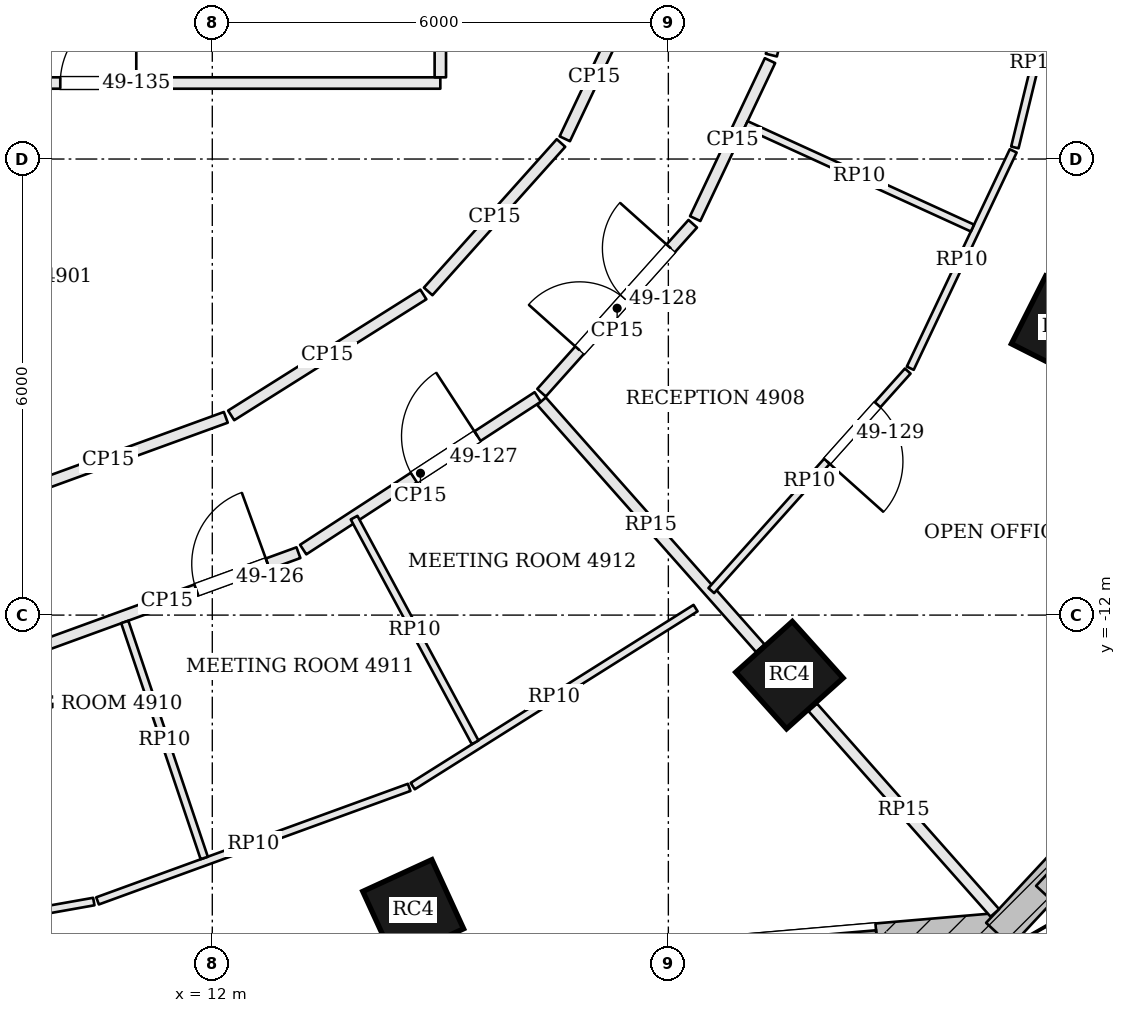
"""IFC4 building model, lengths in metres.
Left out: names, types, materials, properties, quantities, classifications, styles, units other than length and angle.
Written with IfcOpenShell. Run it as: python <this file> out.ifc"""

import sys

from ifc_helpers import new_model, si_unit, direction, frame, frame_2d, origin, origin_2d, place, context, subcontext, project, spatial, rectangle, extrude, element, fill, save


model = new_model("IFC4")
c1 = context("Model", 3, precision=1e-05, world=origin(), true_north=direction((0.0, 1.0)))
c2 = subcontext(c1, "Body", "Model", "MODEL_VIEW")
j1 = project(units=[si_unit("LENGTHUNIT", "METRE"), si_unit("PLANEANGLEUNIT", "RADIAN")], contexts=[c1])
p1 = place(None, origin())
s1 = spatial("IfcSite", under=j1, at=p1, CompositionType="ELEMENT")
p2 = place(p1, origin())
s2 = spatial("IfcBuilding", under=s1, at=p2, CompositionType="ELEMENT")
p3 = place(p2, frame((0.0, 0.0, 201.3)))
s3 = spatial("IfcBuildingStorey", under=s2, at=p3, CompositionType="ELEMENT", Elevation=201.3)
for number, where, z_axis, x_axis in (
    (1, (14.643, -15.881, 0.0), (0.0, 0.0, 1.0), (0.909, 0.417, 0.0)),
    (2, (19.593, -12.79, 0.0), (0.0, 0.0, 1.0), (0.744, 0.668, 0.0)),
    (3, (23.185, -8.21, 0.0), (0.0, 0.0, 1.0), (0.451, 0.893, 0.0)),
):
    element("IfcColumn", number, at=place(p3, frame(where, z_axis=z_axis, x_axis=x_axis)), inside=s3, PredefinedType="COLUMN", context=c2, shape_type="SweptSolid", body=[
        extrude(rectangle(XDim=1.0, YDim=1.0, at=origin_2d()), origin(), (0.0, 0.0, 1.0), 3.9),
    ])
p4 = place(p3, frame((16.91, -16.61, 0.0), z_axis=(0.0, 0.0, 1.0), x_axis=(0.996333165816, 0.085558299972, 0.0)))
e4 = element("IfcWall", 4, at=p4, inside=s3, PredefinedType="SOLIDWALL", context=c2, shape_type="SweptSolid", body=[
    extrude(rectangle(XDim=5.596, YDim=0.45, at=frame_2d((2.798, 0.0))), origin(), (0.0, 0.0, 1.0), 3.7),
])
p5 = place(p4, frame((1.748, 0.0, 0.9)))
e5 = element("IfcOpeningElement", 5, at=p5, cuts=e4, PredefinedType="OPENING", context=c2, shape_type="SweptSolid", body=[
    extrude(rectangle(XDim=2.1, YDim=2.3, at=frame_2d((1.05, 1.15))), frame((0.0, 0.235, 0.0), z_axis=(0.0, -1.0, 0.0), x_axis=(1.0, 0.0, 0.0)), (0.0, 0.0, 1.0), 0.47),
])
p6 = place(p3, frame((22.345, -16.202, 0.0), z_axis=(0.0, 0.0, 1.0), x_axis=(0.681249161265, 0.732051624051, 0.0)))
e6 = element("IfcWall", 6, at=p6, inside=s3, PredefinedType="SOLIDWALL", context=c2, shape_type="SweptSolid", body=[
    extrude(rectangle(XDim=4.527, YDim=0.45, at=frame_2d((2.263, 0.0))), origin(), (0.0, 0.0, 1.0), 3.7),
])
p7 = place(p6, frame((1.213, 0.0, 0.9)))
e7 = element("IfcOpeningElement", 7, at=p7, cuts=e6, PredefinedType="OPENING", context=c2, shape_type="SweptSolid", body=[
    extrude(rectangle(XDim=2.1, YDim=2.3, at=frame_2d((1.05, 1.15))), frame((0.0, 0.235, 0.0), z_axis=(0.0, -1.0, 0.0), x_axis=(1.0, 0.0, 0.0)), (0.0, 0.0, 1.0), 0.47),
])
p8 = place(p3, frame((22.948, -15.665, 3.9), z_axis=(0.0, 0.0, 1.0), x_axis=(0.681269800001, 0.732032417046, 0.0)))
e8 = element("IfcWall", 8, at=p8, inside=s3, PredefinedType="PARAPET", context=c2, shape_type="SweptSolid", body=[
    extrude(rectangle(XDim=3.578, YDim=0.3, at=frame_2d((1.789, 0.0))), origin(), (0.0, 0.0, 1.0), 1.1),
])
p9 = place(p3, frame((9.676, -12.438, 0.0), z_axis=(0.0, 0.0, 1.0), x_axis=(0.939640289748, 0.342163887461, 0.0)))
e9 = element("IfcWall", 9, at=p9, inside=s3, PredefinedType="PARTITIONING", context=c2, shape_type="SweptSolid", body=[
    extrude(rectangle(XDim=3.68, YDim=0.15, at=frame_2d((1.84, 0.0))), origin(), (0.0, 0.0, 1.0), 3.084),
])
p10 = place(p9, frame((2.25, 0.0, 0.0)))
e10 = element("IfcOpeningElement", 10, at=p10, cuts=e9, PredefinedType="OPENING", context=c2, shape_type="SweptSolid", body=[
    extrude(rectangle(XDim=1.0, YDim=2.4, at=frame_2d((0.5, 1.2))), frame((0.0, 0.085, 0.0), z_axis=(0.0, -1.0, 0.0), x_axis=(1.0, 0.0, 0.0)), (0.0, 0.0, 1.0), 0.17),
])
p11 = place(p3, frame((13.196, -11.138, 0.0), z_axis=(0.0, 0.0, 1.0), x_axis=(0.838161670129, 0.545421868582, 0.0)))
e11 = element("IfcWall", 11, at=p11, inside=s3, PredefinedType="PARTITIONING", context=c2, shape_type="SweptSolid", body=[
    extrude(rectangle(XDim=3.681, YDim=0.15, at=frame_2d((1.841, 0.0))), origin(), (0.0, 0.0, 1.0), 3.084),
])
p12 = place(p11, frame((1.736, 0.0, 0.0)))
e12 = element("IfcOpeningElement", 12, at=p12, cuts=e11, PredefinedType="OPENING", context=c2, shape_type="SweptSolid", body=[
    extrude(rectangle(XDim=1.0, YDim=2.4, at=frame_2d((0.5, 1.2))), frame((0.0, 0.085, 0.0), z_axis=(0.0, -1.0, 0.0), x_axis=(1.0, 0.0, 0.0)), (0.0, 0.0, 1.0), 0.17),
])
p13 = place(p3, frame((22.295, -15.918, 0.0), z_axis=(0.0, 0.0, 1.0), x_axis=(-0.663108813626, 0.748523013201, 0.0)))
e13 = element("IfcWall", 13, at=p13, inside=s3, PredefinedType="PARTITIONING", context=c2, shape_type="SweptSolid", body=[
    extrude(rectangle(XDim=3.613, YDim=0.15, at=frame_2d((1.806, 0.0))), origin(), (0.0, 0.0, 1.0), 3.084),
])
p14 = place(p3, frame((19.21, -12.435, 0.0), z_axis=(0.0, 0.0, 1.0), x_axis=(-0.663127094929, 0.748506817584, 0.0)))
e14 = element("IfcWall", 14, at=p14, inside=s3, PredefinedType="PARTITIONING", context=c2, shape_type="SweptSolid", body=[
    extrude(rectangle(XDim=4.341, YDim=0.15, at=frame_2d((2.17, 0.0))), origin(), (0.0, 0.0, 1.0), 3.084),
])
p15 = place(p3, frame((16.332, -9.074, 0.0), z_axis=(0.0, 0.0, 1.0), x_axis=(0.666900122351, 0.74514711756, 0.0)))
e15 = element("IfcWall", 15, at=p15, inside=s3, PredefinedType="PARTITIONING", context=c2, shape_type="SweptSolid", body=[
    extrude(rectangle(XDim=2.983, YDim=0.15, at=frame_2d((1.491, 0.0))), origin(), (0.0, 0.0, 1.0), 3.084),
])
p16 = place(p15, frame((0.75, 0.0, 0.0)))
e16 = element("IfcOpeningElement", 16, at=p16, cuts=e15, PredefinedType="OPENING", context=c2, shape_type="SweptSolid", body=[
    extrude(rectangle(XDim=1.8, YDim=2.1, at=frame_2d((0.9, 1.05))), frame((0.0, 0.085, 0.0), z_axis=(0.0, -1.0, 0.0), x_axis=(1.0, 0.0, 0.0)), (0.0, 0.0, 1.0), 0.17),
])
p17 = place(p3, frame((18.353, -6.784, 0.0), z_axis=(0.0, 0.0, 1.0), x_axis=(0.428086344739, 0.903737838894, 0.0)))
e17 = element("IfcWall", 17, at=p17, inside=s3, PredefinedType="PARTITIONING", context=c2, shape_type="SweptSolid", body=[
    extrude(rectangle(XDim=2.3, YDim=0.15, at=frame_2d((1.15, 0.0))), origin(), (0.0, 0.0, 1.0), 3.084),
])
p18 = place(p3, frame((19.355, -4.633, 0.0), z_axis=(0.0, 0.0, 1.0), x_axis=(0.236703930685, 0.971581828359, 0.0)))
e18 = element("IfcWall", 18, at=p18, inside=s3, PredefinedType="PARTITIONING", context=c2, shape_type="SweptSolid", body=[
    extrude(rectangle(XDim=1.626, YDim=0.15, at=frame_2d((0.813, 0.0))), origin(), (0.0, 0.0, 1.0), 3.084),
])
p19 = place(p3, frame((17.41, -4.102, 0.0), z_axis=(0.0, 0.0, 1.0), x_axis=(-0.428074720318, -0.903743345107, 0.0)))
e19 = element("IfcWall", 19, at=p19, inside=s3, PredefinedType="PARTITIONING", context=c2, shape_type="SweptSolid", body=[
    extrude(rectangle(XDim=1.806, YDim=0.15, at=frame_2d((0.903, 0.0))), origin(), (0.0, 0.0, 1.0), 3.084),
])
p20 = place(p3, frame((16.587, -5.789, 0.0), z_axis=(0.0, 0.0, 1.0), x_axis=(-0.666887460656, -0.745158449472, 0.0)))
e20 = element("IfcWall", 20, at=p20, inside=s3, PredefinedType="PARTITIONING", context=c2, shape_type="SweptSolid", body=[
    extrude(rectangle(XDim=2.62, YDim=0.15, at=frame_2d((1.31, 0.0))), origin(), (0.0, 0.0, 1.0), 3.084),
])
p21 = place(p3, frame((14.777, -7.781, 0.0), z_axis=(0.0, 0.0, 1.0), x_axis=(-0.846359741043, -0.532611667862, 0.0)))
e21 = element("IfcWall", 21, at=p21, inside=s3, PredefinedType="PARTITIONING", context=c2, shape_type="SweptSolid", body=[
    extrude(rectangle(XDim=2.987, YDim=0.15, at=frame_2d((1.494, 0.0))), origin(), (0.0, 0.0, 1.0), 3.084),
])
p22 = place(p3, frame((12.178, -9.398, 0.0), z_axis=(0.0, 0.0, 1.0), x_axis=(-0.939609240084, -0.342249143093, 0.0)))
e22 = element("IfcWall", 22, at=p22, inside=s3, PredefinedType="PARTITIONING", context=c2, shape_type="SweptSolid", body=[
    extrude(rectangle(XDim=3.292, YDim=0.15, at=frame_2d((1.646, 0.0))), origin(), (0.0, 0.0, 1.0), 3.084),
])
p23 = place(p3, frame((-14.925, -5.0, 0.0), z_axis=(0.0, 0.0, 1.0), x_axis=(1.0, 0.0, 0.0)))
e23 = element("IfcWall", 23, at=p23, inside=s3, PredefinedType="PARTITIONING", context=c2, shape_type="SweptSolid", body=[
    extrude(rectangle(XDim=29.925, YDim=0.15, at=frame_2d((14.962, 0.0))), origin(), (0.0, 0.0, 1.0), 3.084),
])
p24 = place(p23, frame((3.925, 0.0, 0.0)))
e24 = element("IfcOpeningElement", 24, at=p24, cuts=e23, PredefinedType="OPENING", context=c2, shape_type="SweptSolid", body=[
    extrude(rectangle(XDim=1.0, YDim=2.1, at=frame_2d((0.5, 1.05))), frame((0.0, 0.085, 0.0), z_axis=(0.0, -1.0, 0.0), x_axis=(1.0, 0.0, 0.0)), (0.0, 0.0, 1.0), 0.17),
])
p25 = place(p23, frame((14.025, 0.0, 0.0)))
e25 = element("IfcOpeningElement", 25, at=p25, cuts=e23, PredefinedType="OPENING", context=c2, shape_type="SweptSolid", body=[
    extrude(rectangle(XDim=1.8, YDim=2.1, at=frame_2d((0.9, 1.05))), frame((0.0, 0.085, 0.0), z_axis=(0.0, -1.0, 0.0), x_axis=(1.0, 0.0, 0.0)), (0.0, 0.0, 1.0), 0.17),
])
p26 = place(p23, frame((24.925, 0.0, 0.0)))
e26 = element("IfcOpeningElement", 26, at=p26, cuts=e23, PredefinedType="OPENING", context=c2, shape_type="SweptSolid", body=[
    extrude(rectangle(XDim=1.0, YDim=2.1, at=frame_2d((0.5, 1.05))), frame((0.0, 0.085, 0.0), z_axis=(0.0, -1.0, 0.0), x_axis=(1.0, 0.0, 0.0)), (0.0, 0.0, 1.0), 0.17),
])
p27 = place(p3, frame((15.0, -4.925, 0.0), z_axis=(0.0, 0.0, 1.0), x_axis=(0.0, 1.0, 0.0)))
e27 = element("IfcWall", 27, at=p27, inside=s3, PredefinedType="PARTITIONING", context=c2, shape_type="SweptSolid", body=[
    extrude(rectangle(XDim=12.583, YDim=0.15, at=frame_2d((6.292, 0.0))), origin(), (0.0, 0.0, 1.0), 3.084),
])
p28 = place(p27, frame((8.291, 0.0, 0.0)))
e28 = element("IfcOpeningElement", 28, at=p28, cuts=e27, PredefinedType="OPENING", context=c2, shape_type="SweptSolid", body=[
    extrude(rectangle(XDim=1.0, YDim=2.1, at=frame_2d((0.5, 1.05))), frame((0.0, 0.085, 0.0), z_axis=(0.0, -1.0, 0.0), x_axis=(1.0, 0.0, 0.0)), (0.0, 0.0, 1.0), 0.17),
])
p29 = place(p3, frame((18.358, -11.908, 0.0), z_axis=(0.0, 0.0, 1.0), x_axis=(-0.846371924556, -0.532592306857, 0.0)))
e29 = element("IfcWall", 29, at=p29, inside=s3, PredefinedType="PARTITIONING", context=c2, shape_type="SweptSolid", body=[
    extrude(rectangle(XDim=4.396, YDim=0.1, at=frame_2d((2.198, 0.0))), origin(), (0.0, 0.0, 1.0), 3.084),
])
p30 = place(p3, frame((14.59, -14.267, 0.0), z_axis=(0.0, 0.0, 1.0), x_axis=(-0.939623405418, -0.342210251148, 0.0)))
e30 = element("IfcWall", 30, at=p30, inside=s3, PredefinedType="PARTITIONING", context=c2, shape_type="SweptSolid", body=[
    extrude(rectangle(XDim=4.363, YDim=0.1, at=frame_2d((2.182, 0.0))), origin(), (0.0, 0.0, 1.0), 3.084),
])
p31 = place(p3, frame((10.441, -15.769, 0.0), z_axis=(0.0, 0.0, 1.0), x_axis=(-0.984642067447, -0.174585219919, 0.0)))
e31 = element("IfcWall", 31, at=p31, inside=s3, PredefinedType="PARTITIONING", context=c2, shape_type="SweptSolid", body=[
    extrude(rectangle(XDim=5.258, YDim=0.1, at=frame_2d((2.629, 0.0))), origin(), (0.0, 0.0, 1.0), 3.084),
])
p32 = place(p31, frame((3.569, 0.0, 0.0)))
e32 = element("IfcOpeningElement", 32, at=p32, cuts=e31, PredefinedType="OPENING", context=c2, shape_type="SweptSolid", body=[
    extrude(rectangle(XDim=1.0, YDim=2.1, at=frame_2d((0.5, 1.05))), frame((0.0, 0.06, 0.0), z_axis=(0.0, -1.0, 0.0), x_axis=(1.0, 0.0, 0.0)), (0.0, 0.0, 1.0), 0.12),
])
p33 = place(p3, frame((10.849, -12.091, 0.0), z_axis=(0.0, 0.0, 1.0), x_axis=(0.319043433682, -0.94774009487, 0.0)))
e33 = element("IfcWall", 33, at=p33, inside=s3, PredefinedType="PARTITIONING", context=c2, shape_type="SweptSolid", body=[
    extrude(rectangle(XDim=3.276, YDim=0.1, at=frame_2d((1.638, 0.0))), origin(), (0.0, 0.0, 1.0), 3.084),
])
p34 = place(p3, frame((13.865, -10.718, 0.0), z_axis=(0.0, 0.0, 1.0), x_axis=(0.474286256433, -0.880370687244, 0.0)))
e34 = element("IfcWall", 34, at=p34, inside=s3, PredefinedType="PARTITIONING", context=c2, shape_type="SweptSolid", body=[
    extrude(rectangle(XDim=3.358, YDim=0.1, at=frame_2d((1.679, 0.0))), origin(), (0.0, 0.0, 1.0), 3.084),
])
p35 = place(p3, frame((23.101, -3.623, 0.0), z_axis=(0.0, 0.0, 1.0), x_axis=(-0.236811358433, -0.971555649727, 0.0)))
e35 = element("IfcWall", 35, at=p35, inside=s3, PredefinedType="PARTITIONING", context=c2, shape_type="SweptSolid", body=[
    extrude(rectangle(XDim=2.29, YDim=0.1, at=frame_2d((1.145, 0.0))), origin(), (0.0, 0.0, 1.0), 3.084),
])
p36 = place(p3, frame((22.537, -5.893, 0.0), z_axis=(0.0, 0.0, 1.0), x_axis=(-0.428099612517, -0.903731554037, 0.0)))
e36 = element("IfcWall", 36, at=p36, inside=s3, PredefinedType="PARTITIONING", context=c2, shape_type="SweptSolid", body=[
    extrude(rectangle(XDim=3.164, YDim=0.1, at=frame_2d((1.582, 0.0))), origin(), (0.0, 0.0, 1.0), 3.084),
])
p37 = place(p3, frame((21.149, -8.789, 0.0), z_axis=(0.0, 0.0, 1.0), x_axis=(-0.666936636431, -0.745114436168, 0.0)))
e37 = element("IfcWall", 37, at=p37, inside=s3, PredefinedType="PARTITIONING", context=c2, shape_type="SweptSolid", body=[
    extrude(rectangle(XDim=3.875, YDim=0.1, at=frame_2d((1.938, 0.0))), origin(), (0.0, 0.0, 1.0), 3.084),
])
p38 = place(p37, frame((0.594, 0.0, 0.0)))
e38 = element("IfcOpeningElement", 38, at=p38, cuts=e37, PredefinedType="OPENING", context=c2, shape_type="SweptSolid", body=[
    extrude(rectangle(XDim=1.0, YDim=2.1, at=frame_2d((0.5, 1.05))), frame((0.0, 0.06, 0.0), z_axis=(0.0, -1.0, 0.0), x_axis=(1.0, 0.0, 0.0)), (0.0, 0.0, 1.0), 0.12),
])
p39 = place(p3, frame((19.022, -5.547, 0.0), z_axis=(0.0, 0.0, 1.0), x_axis=(0.909573496754, -0.415543083209, 0.0)))
e39 = element("IfcWall", 39, at=p39, inside=s3, PredefinedType="PARTITIONING", context=c2, shape_type="SweptSolid", body=[
    extrude(rectangle(XDim=3.275, YDim=0.1, at=frame_2d((1.638, 0.0))), origin(), (0.0, 0.0, 1.0), 3.084),
])
p40 = place(p5, origin())
e40 = element("IfcWindow", 40, at=p40, inside=s3, PartitioningType="SINGLE_PANEL", PredefinedType="WINDOW", context=c2, shape_type="SweptSolid", body=[
    extrude(rectangle(XDim=2.1, YDim=2.3, at=frame_2d((1.05, 1.15))), frame((0.0, 0.135, 0.0), z_axis=(0.0, -1.0, 0.0), x_axis=(1.0, 0.0, 0.0)), (0.0, 0.0, 1.0), 0.06),
])
fill(e5, e40)
p41 = place(p10, origin())
e41 = element("IfcDoor", 41, at=p41, inside=s3, OperationType="SINGLE_SWING_RIGHT", PredefinedType="DOOR", context=c2, shape_type="SweptSolid", body=[
    extrude(rectangle(XDim=1.0, YDim=2.4, at=frame_2d((0.5, 1.2))), frame((0.0, 0.025, 0.0), z_axis=(0.0, -1.0, 0.0), x_axis=(1.0, 0.0, 0.0)), (0.0, 0.0, 1.0), 0.05),
])
fill(e10, e41)
p42 = place(p12, origin())
e42 = element("IfcDoor", 42, at=p42, inside=s3, OperationType="SINGLE_SWING_RIGHT", PredefinedType="DOOR", context=c2, shape_type="SweptSolid", body=[
    extrude(rectangle(XDim=1.0, YDim=2.4, at=frame_2d((0.5, 1.2))), frame((0.0, 0.025, 0.0), z_axis=(0.0, -1.0, 0.0), x_axis=(1.0, 0.0, 0.0)), (0.0, 0.0, 1.0), 0.05),
])
fill(e12, e42)
p43 = place(p16, origin())
e43 = element("IfcDoor", 43, at=p43, inside=s3, OperationType="DOUBLE_DOOR_SINGLE_SWING", PredefinedType="DOOR", context=c2, shape_type="SweptSolid", body=[
    extrude(rectangle(XDim=1.8, YDim=2.1, at=frame_2d((0.9, 1.05))), frame((0.0, 0.025, 0.0), z_axis=(0.0, -1.0, 0.0), x_axis=(1.0, 0.0, 0.0)), (0.0, 0.0, 1.0), 0.05),
])
fill(e16, e43)
p44 = place(p38, origin())
e44 = element("IfcDoor", 44, at=p44, inside=s3, OperationType="SINGLE_SWING_RIGHT", PredefinedType="DOOR", context=c2, shape_type="SweptSolid", body=[
    extrude(rectangle(XDim=1.0, YDim=2.1, at=frame_2d((0.5, 1.05))), frame((0.0, 0.025, 0.0), z_axis=(0.0, -1.0, 0.0), x_axis=(1.0, 0.0, 0.0)), (0.0, 0.0, 1.0), 0.05),
])
fill(e38, e44)
p45 = place(p26, origin())
e45 = element("IfcDoor", 45, at=p45, inside=s3, OperationType="SINGLE_SWING_RIGHT", PredefinedType="DOOR", context=c2, shape_type="SweptSolid", body=[
    extrude(rectangle(XDim=1.0, YDim=2.1, at=frame_2d((0.5, 1.05))), frame((0.0, 0.025, 0.0), z_axis=(0.0, -1.0, 0.0), x_axis=(1.0, 0.0, 0.0)), (0.0, 0.0, 1.0), 0.05),
])
fill(e26, e45)
save(model, sys.argv[1])
